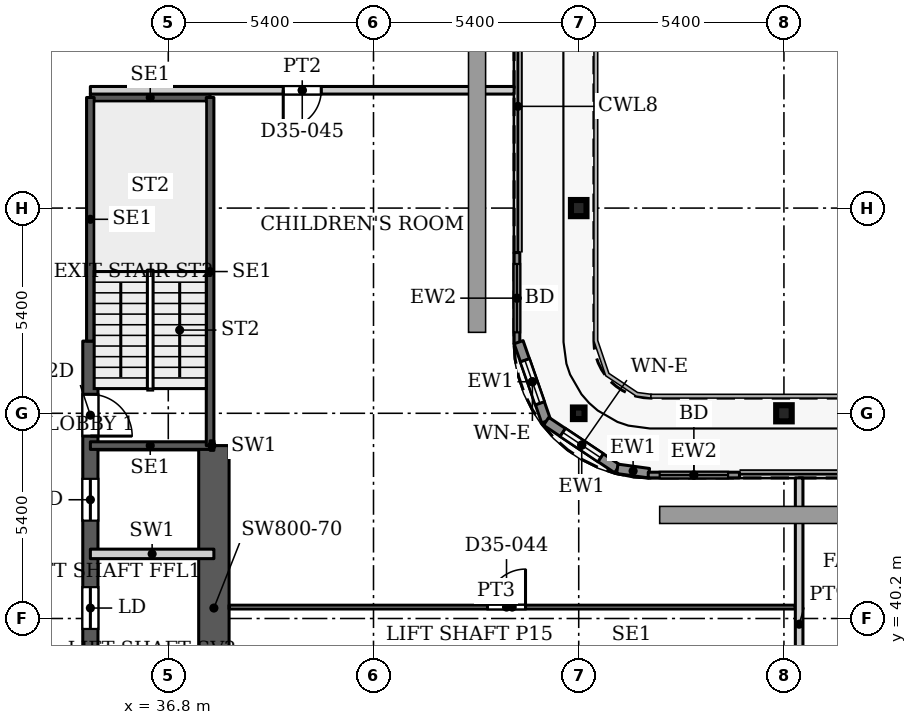
"""IFC4 building model, lengths in metres.
Left out: names, types, materials, properties, quantities, classifications, styles, units other than length and angle.
Written with IfcOpenShell. Run it as: python <this file> out.ifc"""

import sys

from ifc_helpers import new_model, si_unit, direction, frame, frame_2d, origin, origin_2d, place, context, subcontext, project, spatial, rectangle, hollow_rectangle, i_section, extrude, source, transform, mapped, element, fill, save


model = new_model("IFC4")
c1 = context("Model", 3, precision=1e-05, world=origin(), true_north=direction((0.0, 1.0)))
c2 = subcontext(c1, "Body", "Model", "MODEL_VIEW")
j1 = project(units=[si_unit("LENGTHUNIT", "METRE"), si_unit("PLANEANGLEUNIT", "RADIAN")], contexts=[c1])
p1 = place(None, origin())
s1 = spatial("IfcSite", under=j1, at=p1, CompositionType="ELEMENT")
p2 = place(p1, origin())
s2 = spatial("IfcBuilding", under=s1, at=p2, CompositionType="ELEMENT")
p3 = place(p2, frame((0.0, 0.0, 152.6)))
s3 = spatial("IfcBuildingStorey", under=s2, at=p3, CompositionType="ELEMENT", Elevation=152.6)
for number, where, z_axis, x_axis in (
    (1, (53.0, 45.6, 0.0), (0.0, 0.0, 1.0), (1.0, 0.0, 0.0)),
    (2, (47.6, 51.0, 0.0), (0.0, 0.0, 1.0), (1.0, 0.0, 0.0)),
):
    element("IfcColumn", number, at=place(p3, frame(where, z_axis=z_axis, x_axis=x_axis)), inside=s3, PredefinedType="COLUMN", context=c2, shape_type="SweptSolid", body=[
        extrude(i_section(OverallWidth=0.409, OverallDepth=0.425, WebThickness=0.033, FlangeThickness=0.052, FilletRadius=0.013, at=origin_2d()), origin(), (0.0, 0.0, 1.0), 3.9),
    ])
p4 = place(p3, frame((47.6, 45.6, 0.0), z_axis=(0.0, 0.0, 1.0), x_axis=(1.0, 0.0, 0.0)))
e3 = element("IfcColumn", 3, at=p4, inside=s3, PredefinedType="COLUMN", context=c2, shape_type="SweptSolid", body=[
    extrude(hollow_rectangle(XDim=0.305, YDim=0.305, WallThickness=0.016, InnerFilletRadius=0.016, OuterFilletRadius=0.032, at=origin_2d()), origin(), (0.0, 0.0, 1.0), 3.9),
])
p5 = place(p3, frame((34.75, 29.05, 0.0), z_axis=(0.0, 0.0, 1.0), x_axis=(0.0, 1.0, 0.0)))
e4 = element("IfcWall", 4, at=p5, inside=s3, PredefinedType="SHEAR", context=c2, shape_type="SweptSolid", body=[
    extrude(rectangle(XDim=18.45, YDim=0.4, at=frame_2d((9.225, 0.0))), origin(), (0.0, 0.0, 1.0), 3.9),
])
p6 = place(p5, frame((8.025, 0.0, 0.0)))
e5 = element("IfcOpeningElement", 5, at=p6, cuts=e4, PredefinedType="OPENING", context=c2, shape_type="SweptSolid", body=[
    extrude(rectangle(XDim=1.1, YDim=2.2, at=frame_2d((0.55, 1.1))), frame((0.0, 0.21, 0.0), z_axis=(0.0, -1.0, 0.0), x_axis=(1.0, 0.0, 0.0)), (0.0, 0.0, 1.0), 0.42),
])
p7 = place(p5, frame((10.875, 0.0, 0.0)))
e6 = element("IfcOpeningElement", 6, at=p7, cuts=e4, PredefinedType="OPENING", context=c2, shape_type="SweptSolid", body=[
    extrude(rectangle(XDim=1.1, YDim=2.2, at=frame_2d((0.55, 1.1))), frame((0.0, 0.21, 0.0), z_axis=(0.0, -1.0, 0.0), x_axis=(1.0, 0.0, 0.0)), (0.0, 0.0, 1.0), 0.42),
])
p8 = place(p5, frame((13.725, 0.0, 0.0)))
e7 = element("IfcOpeningElement", 7, at=p8, cuts=e4, PredefinedType="OPENING", context=c2, shape_type="SweptSolid", body=[
    extrude(rectangle(XDim=1.1, YDim=2.2, at=frame_2d((0.55, 1.1))), frame((0.0, 0.21, 0.0), z_axis=(0.0, -1.0, 0.0), x_axis=(1.0, 0.0, 0.0)), (0.0, 0.0, 1.0), 0.42),
])
p9 = place(p5, frame((15.95, 0.0, 0.0)))
e8 = element("IfcOpeningElement", 8, at=p9, cuts=e4, PredefinedType="OPENING", context=c2, shape_type="SweptSolid", body=[
    extrude(rectangle(XDim=1.1, YDim=2.2, at=frame_2d((0.55, 1.1))), frame((0.0, 0.21, 0.0), z_axis=(0.0, -1.0, 0.0), x_axis=(1.0, 0.0, 0.0)), (0.0, 0.0, 1.0), 0.42),
])
p10 = place(p3, frame((38.0, 36.2, 0.0), z_axis=(0.0, 0.0, 1.0), x_axis=(0.0, 1.0, 0.0)))
e9 = element("IfcWall", 9, at=p10, inside=s3, PredefinedType="SHEAR", context=c2, shape_type="SweptSolid", body=[
    extrude(rectangle(XDim=8.55, YDim=0.8, at=frame_2d((4.275, 0.0))), origin(), (0.0, 0.0, 1.0), 3.9),
])
p11 = place(p3, frame((45.975, 49.83, 0.0), z_axis=(0.0, 0.0, 1.0), x_axis=(0.0, -1.0, 0.0)))
e10 = element("IfcWall", 10, at=p11, inside=s3, PredefinedType="SOLIDWALL", context=c2, shape_type="SweptSolid", body=[
    extrude(rectangle(XDim=2.4, YDim=0.15, at=frame_2d((1.2, 0.0))), origin(), (0.0, 0.0, 1.0), 3.75),
])
p12 = place(p11, frame((0.3, 0.0, 0.0)))
e11 = element("IfcOpeningElement", 11, at=p12, cuts=e10, PredefinedType="OPENING", context=c2, shape_type="SweptSolid", body=[
    extrude(rectangle(XDim=1.8, YDim=2.4, at=frame_2d((0.9, 1.2))), frame((0.0, 0.085, 0.0), z_axis=(0.0, -1.0, 0.0), x_axis=(1.0, 0.0, 0.0)), (0.0, 0.0, 1.0), 0.17),
])
p13 = place(p3, frame((46.018, 47.471, 0.0), z_axis=(0.0, 0.0, 1.0), x_axis=(0.328791208903, -0.944402637093, 0.0)))
e12 = element("IfcWall", 12, at=p13, inside=s3, PredefinedType="SOLIDWALL", context=c2, shape_type="SweptSolid", body=[
    extrude(rectangle(XDim=2.205, YDim=0.25, at=frame_2d((1.102, 0.0))), origin(), (0.0, 0.0, 1.0), 3.75),
])
p14 = place(p13, frame((0.503, 0.0, 0.6)))
e13 = element("IfcOpeningElement", 13, at=p14, cuts=e12, PredefinedType="OPENING", context=c2, shape_type="SweptSolid", body=[
    extrude(rectangle(XDim=1.2, YDim=2.1, at=frame_2d((0.6, 1.05))), frame((0.0, 0.135, 0.0), z_axis=(0.0, -1.0, 0.0), x_axis=(1.0, 0.0, 0.0)), (0.0, 0.0, 1.0), 0.27),
])
p15 = place(p3, frame((46.743, 45.389, 0.0), z_axis=(0.0, 0.0, 1.0), x_axis=(0.831449265529, -0.555600682912, 0.0)))
e14 = element("IfcWall", 14, at=p15, inside=s3, PredefinedType="SOLIDWALL", context=c2, shape_type="SweptSolid", body=[
    extrude(rectangle(XDim=2.251, YDim=0.25, at=frame_2d((1.126, 0.0))), origin(), (0.0, 0.0, 1.0), 3.75),
])
p16 = place(p15, frame((0.525, 0.0, 0.6)))
e15 = element("IfcOpeningElement", 15, at=p16, cuts=e14, PredefinedType="OPENING", context=c2, shape_type="SweptSolid", body=[
    extrude(rectangle(XDim=1.2, YDim=2.1, at=frame_2d((0.6, 1.05))), frame((0.0, 0.135, 0.0), z_axis=(0.0, -1.0, 0.0), x_axis=(1.0, 0.0, 0.0)), (0.0, 0.0, 1.0), 0.27),
])
p17 = place(p3, frame((48.615, 44.138, 0.0), z_axis=(0.0, 0.0, 1.0), x_axis=(0.990741504246, -0.135761819977, 0.0)))
e16 = element("IfcWall", 16, at=p17, inside=s3, PredefinedType="SOLIDWALL", context=c2, shape_type="SweptSolid", body=[
    extrude(rectangle(XDim=0.84, YDim=0.25, at=frame_2d((0.42, 0.0))), origin(), (0.0, 0.0, 1.0), 3.75),
])
p18 = place(p3, frame((49.43, 43.975, 0.0), z_axis=(0.0, 0.0, 1.0), x_axis=(1.0, 0.0, 0.0)))
e17 = element("IfcWall", 17, at=p18, inside=s3, PredefinedType="SOLIDWALL", context=c2, shape_type="SweptSolid", body=[
    extrude(rectangle(XDim=2.4, YDim=0.15, at=frame_2d((1.2, 0.0))), origin(), (0.0, 0.0, 1.0), 3.75),
])
p19 = place(p18, frame((0.3, 0.0, 0.0)))
e18 = element("IfcOpeningElement", 18, at=p19, cuts=e17, PredefinedType="OPENING", context=c2, shape_type="SweptSolid", body=[
    extrude(rectangle(XDim=1.8, YDim=2.4, at=frame_2d((0.9, 1.2))), frame((0.0, 0.085, 0.0), z_axis=(0.0, -1.0, 0.0), x_axis=(1.0, 0.0, 0.0)), (0.0, 0.0, 1.0), 0.17),
])
for number, where, z_axis, x_axis in (
    (19, (34.75, 44.75, 0.0), (0.0, 0.0, 1.0), (1.0, 0.0, 0.0)),
    (20, (34.75, 53.91, 0.0), (0.0, 0.0, 1.0), (1.0, 0.0, 0.0)),
):
    element("IfcWall", number, at=place(p3, frame(where, z_axis=z_axis, x_axis=x_axis)), inside=s3, PredefinedType="SHEAR", context=c2, shape_type="SweptSolid", body=[
        extrude(rectangle(XDim=3.15, YDim=0.2, at=frame_2d((1.575, 0.0))), origin(), (0.0, 0.0, 1.0), 3.9),
    ])
p20 = place(p3, frame((34.75, 47.5, 0.0), z_axis=(0.0, 0.0, 1.0), x_axis=(0.0, 1.0, 0.0)))
e21 = element("IfcWall", 21, at=p20, inside=s3, PredefinedType="SHEAR", context=c2, shape_type="SweptSolid", body=[
    extrude(rectangle(XDim=6.41, YDim=0.2, at=frame_2d((3.205, 0.0))), origin(), (0.0, 0.0, 1.0), 3.9),
])
p21 = place(p3, frame((37.9, 44.75, 0.0), z_axis=(0.0, 0.0, 1.0), x_axis=(0.0, 1.0, 0.0)))
e22 = element("IfcWall", 22, at=p21, inside=s3, PredefinedType="SHEAR", context=c2, shape_type="SweptSolid", body=[
    extrude(rectangle(XDim=9.16, YDim=0.2, at=frame_2d((4.58, 0.0))), origin(), (0.0, 0.0, 1.0), 3.9),
])
p22 = place(p3, frame((34.75, 41.9, 0.0), z_axis=(0.0, 0.0, 1.0), x_axis=(1.0, 0.0, 0.0)))
e23 = element("IfcWall", 23, at=p22, inside=s3, PredefinedType="PARTITIONING", context=c2, shape_type="SweptSolid", body=[
    extrude(rectangle(XDim=3.25, YDim=0.25, at=frame_2d((1.625, 0.0))), origin(), (0.0, 0.0, 1.0), 3.9),
])
p23 = place(p3, frame((37.9, 44.75, 0.0), z_axis=(0.0, 0.0, 1.0), x_axis=(1.0, 0.0, 0.0)))
e24 = element("IfcWall", 24, at=p23, inside=s3, PredefinedType="PARTITIONING", context=c2, shape_type="SweptSolid", body=[
    extrude(rectangle(XDim=0.1, YDim=0.25, at=frame_2d((0.05, 0.0))), origin(), (0.0, 0.0, 1.0), 3.9),
])
p24 = place(p3, frame((34.75, 54.1, 0.0), z_axis=(0.0, 0.0, 1.0), x_axis=(1.0, 0.0, 0.0)))
e25 = element("IfcWall", 25, at=p24, inside=s3, PredefinedType="PARTITIONING", context=c2, shape_type="SweptSolid", body=[
    extrude(rectangle(XDim=11.15, YDim=0.2, at=frame_2d((5.575, 0.0))), origin(), (0.0, 0.0, 1.0), 3.6),
])
p25 = place(p24, frame((5.075, 0.0, 0.0)))
e26 = element("IfcOpeningElement", 26, at=p25, cuts=e25, PredefinedType="OPENING", context=c2, shape_type="SweptSolid", body=[
    extrude(rectangle(XDim=1.0, YDim=2.1, at=frame_2d((0.5, 1.05))), frame((0.0, 0.11, 0.0), z_axis=(0.0, -1.0, 0.0), x_axis=(1.0, 0.0, 0.0)), (0.0, 0.0, 1.0), 0.22),
])
p26 = place(p3, frame((38.399, 40.5, 0.0), z_axis=(0.0, 0.0, 1.0), x_axis=(1.0, 0.0, 0.0)))
e27 = element("IfcWall", 27, at=p26, inside=s3, PredefinedType="PARTITIONING", context=c2, shape_type="SweptSolid", body=[
    extrude(rectangle(XDim=14.901, YDim=0.1, at=frame_2d((7.451, 0.0))), origin(), (0.0, 0.0, 1.0), 3.6),
])
p27 = place(p26, frame((6.801, 0.0, 0.0)))
e28 = element("IfcOpeningElement", 28, at=p27, cuts=e27, PredefinedType="OPENING", context=c2, shape_type="SweptSolid", body=[
    extrude(rectangle(XDim=1.0, YDim=2.1, at=frame_2d((0.5, 1.05))), frame((0.0, 0.06, 0.0), z_axis=(0.0, -1.0, 0.0), x_axis=(1.0, 0.0, 0.0)), (0.0, 0.0, 1.0), 0.12),
])
p28 = place(p3, frame((53.4, 36.199, 0.0), z_axis=(0.0, 0.0, 1.0), x_axis=(0.0, 1.0, 0.0)))
e29 = element("IfcWall", 29, at=p28, inside=s3, PredefinedType="PARTITIONING", context=c2, shape_type="SweptSolid", body=[
    extrude(rectangle(XDim=7.701, YDim=0.2, at=frame_2d((3.851, 0.0))), origin(), (0.0, 0.0, 1.0), 3.6),
])
m1 = source(origin(), c2, "Body", "SweptSolid", [
    extrude(rectangle(XDim=1.8, YDim=2.4, at=frame_2d((0.9, 1.2))), frame((0.0, 0.025, 0.0), z_axis=(0.0, -1.0, 0.0), x_axis=(1.0, 0.0, 0.0)), (0.0, 0.0, 1.0), 0.05),
])
p29 = place(p12, origin())
e30 = element("IfcDoor", 30, at=p29, inside=s3, OperationType="SLIDING_TO_LEFT", PredefinedType="DOOR", context=c2, shape_type="MappedRepresentation", body=[
    mapped(m1, transform((0.0, 0.0, 0.0), x_axis=(1.0, 0.0, 0.0), y_axis=(0.0, 1.0, 0.0), z_axis=(0.0, 0.0, 1.0), scale=1.0)),
])
fill(e11, e30)
m2 = source(origin(), c2, "Body", "SweptSolid", [
    extrude(rectangle(XDim=1.2, YDim=2.1, at=frame_2d((0.6, 1.05))), frame((0.0, 0.03, 0.0), z_axis=(0.0, -1.0, 0.0), x_axis=(1.0, 0.0, 0.0)), (0.0, 0.0, 1.0), 0.06),
])
p30 = place(p14, origin())
e31 = element("IfcWindow", 31, at=p30, inside=s3, PartitioningType="SINGLE_PANEL", PredefinedType="WINDOW", context=c2, shape_type="MappedRepresentation", body=[
    mapped(m2, transform((0.0, 0.0, 0.0), x_axis=(1.0, 0.0, 0.0), y_axis=(0.0, 1.0, 0.0), z_axis=(0.0, 0.0, 1.0), scale=1.0)),
])
fill(e13, e31)
p31 = place(p16, origin())
e32 = element("IfcWindow", 32, at=p31, inside=s3, PartitioningType="SINGLE_PANEL", PredefinedType="WINDOW", context=c2, shape_type="MappedRepresentation", body=[
    mapped(m2, transform((0.0, 0.0, 0.0), x_axis=(1.0, 0.0, 0.0), y_axis=(0.0, 1.0, 0.0), z_axis=(0.0, 0.0, 1.0), scale=1.0)),
])
fill(e15, e32)
p32 = place(p19, origin())
e33 = element("IfcDoor", 33, at=p32, inside=s3, OperationType="SLIDING_TO_LEFT", PredefinedType="DOOR", context=c2, shape_type="MappedRepresentation", body=[
    mapped(m1, transform((0.0, 0.0, 0.0), x_axis=(1.0, 0.0, 0.0), y_axis=(0.0, 1.0, 0.0), z_axis=(0.0, 0.0, 1.0), scale=1.0)),
])
fill(e18, e33)
m3 = source(origin(), c2, "Body", "SweptSolid", [
    extrude(rectangle(XDim=1.1, YDim=2.2, at=frame_2d((0.55, 1.1))), frame((0.0, 0.025, 0.0), z_axis=(0.0, -1.0, 0.0), x_axis=(1.0, 0.0, 0.0)), (0.0, 0.0, 1.0), 0.05),
])
p33 = place(p7, origin())
e34 = element("IfcDoor", 34, at=p33, inside=s3, OperationType="SLIDING_TO_LEFT", PredefinedType="DOOR", context=c2, shape_type="MappedRepresentation", body=[
    mapped(m3, transform((0.0, 0.0, 0.0), x_axis=(1.0, 0.0, 0.0), y_axis=(0.0, 1.0, 0.0), z_axis=(0.0, 0.0, 1.0), scale=1.0)),
])
fill(e6, e34)
p34 = place(p8, origin())
e35 = element("IfcDoor", 35, at=p34, inside=s3, OperationType="SLIDING_TO_LEFT", PredefinedType="DOOR", context=c2, shape_type="MappedRepresentation", body=[
    mapped(m3, transform((0.0, 0.0, 0.0), x_axis=(1.0, 0.0, 0.0), y_axis=(0.0, 1.0, 0.0), z_axis=(0.0, 0.0, 1.0), scale=1.0)),
])
fill(e7, e35)
m4 = source(origin(), c2, "Body", "SweptSolid", [
    extrude(rectangle(XDim=1.1, YDim=2.2, at=frame_2d((0.55, 1.1))), frame((0.0, 0.025, 0.0), z_axis=(0.0, -1.0, 0.0), x_axis=(1.0, 0.0, 0.0)), (0.0, 0.0, 1.0), 0.05),
])
p35 = place(p9, origin())
e36 = element("IfcDoor", 36, at=p35, inside=s3, OperationType="SINGLE_SWING_RIGHT", PredefinedType="DOOR", context=c2, shape_type="MappedRepresentation", body=[
    mapped(m4, transform((0.0, 0.0, 0.0), x_axis=(1.0, 0.0, 0.0), y_axis=(0.0, 1.0, 0.0), z_axis=(0.0, 0.0, 1.0), scale=1.0)),
])
fill(e8, e36)
m5 = source(origin(), c2, "Body", "SweptSolid", [
    extrude(rectangle(XDim=1.0, YDim=2.1, at=frame_2d((0.5, 1.05))), frame((0.0, 0.025, 0.0), z_axis=(0.0, -1.0, 0.0), x_axis=(1.0, 0.0, 0.0)), (0.0, 0.0, 1.0), 0.05),
])
p36 = place(p27, origin())
e37 = element("IfcDoor", 37, at=p36, inside=s3, OperationType="SINGLE_SWING_LEFT", PredefinedType="DOOR", context=c2, shape_type="MappedRepresentation", body=[
    mapped(m5, transform((0.0, 0.0, 0.0), x_axis=(1.0, 0.0, 0.0), y_axis=(0.0, 1.0, 0.0), z_axis=(0.0, 0.0, 1.0), scale=1.0)),
])
fill(e28, e37)
m6 = source(origin(), c2, "Body", "SweptSolid", [
    extrude(rectangle(XDim=1.0, YDim=2.1, at=frame_2d((0.5, 1.05))), frame((0.0, 0.025, 0.0), z_axis=(0.0, -1.0, 0.0), x_axis=(1.0, 0.0, 0.0)), (0.0, 0.0, 1.0), 0.05),
])
p37 = place(p25, origin())
e38 = element("IfcDoor", 38, at=p37, inside=s3, OperationType="SINGLE_SWING_RIGHT", PredefinedType="DOOR", context=c2, shape_type="MappedRepresentation", body=[
    mapped(m6, transform((0.0, 0.0, 0.0), x_axis=(1.0, 0.0, 0.0), y_axis=(0.0, 1.0, 0.0), z_axis=(0.0, 0.0, 1.0), scale=1.0)),
])
fill(e26, e38)
save(model, sys.argv[1])
